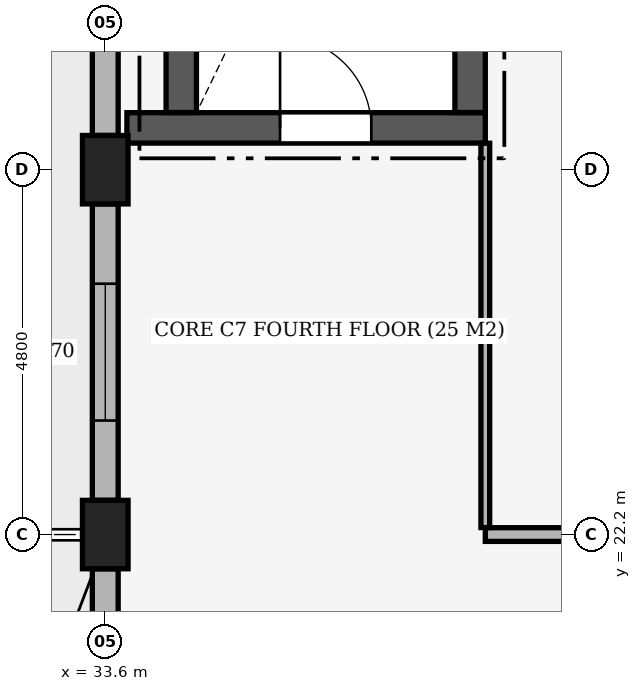
"""IFC4 building model, lengths in metres.
Left out: names, types, materials, properties, quantities, classifications, styles, units other than length and angle.
Written with IfcOpenShell. Run it as: python <this file> out.ifc"""

import sys

from ifc_helpers import new_model, si_unit, direction, frame, frame_2d, origin, origin_2d, place, context, subcontext, project, spatial, rectangle, extrude, element, fill, save


model = new_model("IFC4")
c1 = context("Model", 3, precision=1e-05, world=origin(), true_north=direction((0.0, 1.0)))
c2 = subcontext(c1, "Body", "Model", "MODEL_VIEW")
j1 = project(units=[si_unit("LENGTHUNIT", "METRE"), si_unit("PLANEANGLEUNIT", "RADIAN")], contexts=[c1])
p1 = place(None, origin())
s1 = spatial("IfcSite", under=j1, at=p1, CompositionType="ELEMENT")
p2 = place(p1, origin())
s2 = spatial("IfcBuilding", under=s1, at=p2, CompositionType="ELEMENT")
p3 = place(p2, frame((0.0, 0.0, 20.4)))
s3 = spatial("IfcBuildingStorey", under=s2, at=p3, CompositionType="ELEMENT", Elevation=20.4)
for number, where, z_axis, x_axis in (
    (1, (33.6, 22.2, 0.0), (0.0, 0.0, 1.0), (1.0, 0.0, 0.0)),
    (2, (33.6, 27.0, 0.0), (0.0, 0.0, 1.0), (1.0, 0.0, 0.0)),
):
    element("IfcColumn", number, at=place(p3, frame(where, z_axis=z_axis, x_axis=x_axis)), inside=s3, PredefinedType="COLUMN", context=c2, shape_type="SweptSolid", body=[
        extrude(rectangle(XDim=0.6, YDim=0.9, at=origin_2d()), origin(), (0.0, 0.0, 1.0), 4.8),
    ])
p4 = place(p3, frame((33.6, 5.85, 0.0), z_axis=(0.0, 0.0, 1.0), x_axis=(0.0, 1.0, 0.0)))
e3 = element("IfcWall", 3, at=p4, inside=s3, PredefinedType="SOLIDWALL", context=c2, shape_type="SweptSolid", body=[
    extrude(rectangle(XDim=15.9, YDim=0.34, at=frame_2d((7.95, 0.0))), origin(), (0.0, 0.0, 1.0), 3.5),
])
p5 = place(p4, frame((4.233, 0.0, 1.05)))
e4 = element("IfcOpeningElement", 4, at=p5, cuts=e3, PredefinedType="OPENING", context=c2, shape_type="SweptSolid", body=[
    extrude(rectangle(XDim=1.6, YDim=1.8, at=frame_2d((0.8, 0.9))), frame((0.0, 0.185, 0.0), z_axis=(0.0, -1.0, 0.0), x_axis=(1.0, 0.0, 0.0)), (0.0, 0.0, 1.0), 0.37),
])
p6 = place(p4, frame((10.067, 0.0, 1.05)))
e5 = element("IfcOpeningElement", 5, at=p6, cuts=e3, PredefinedType="OPENING", context=c2, shape_type="SweptSolid", body=[
    extrude(rectangle(XDim=1.6, YDim=1.8, at=frame_2d((0.8, 0.9))), frame((0.0, 0.185, 0.0), z_axis=(0.0, -1.0, 0.0), x_axis=(1.0, 0.0, 0.0)), (0.0, 0.0, 1.0), 0.37),
])
p7 = place(p3, frame((33.6, 22.65, 0.0), z_axis=(0.0, 0.0, 1.0), x_axis=(0.0, 1.0, 0.0)))
e6 = element("IfcWall", 6, at=p7, inside=s3, PredefinedType="SOLIDWALL", context=c2, shape_type="SweptSolid", body=[
    extrude(rectangle(XDim=3.9, YDim=0.34, at=frame_2d((1.95, 0.0))), origin(), (0.0, 0.0, 1.0), 4.0),
])
p8 = place(p7, frame((1.05, 0.0, 0.85)))
e7 = element("IfcOpeningElement", 7, at=p8, cuts=e6, PredefinedType="OPENING", context=c2, shape_type="SweptSolid", body=[
    extrude(rectangle(XDim=1.8, YDim=2.4, at=frame_2d((0.9, 1.2))), frame((0.0, 0.185, 0.0), z_axis=(0.0, -1.0, 0.0), x_axis=(1.0, 0.0, 0.0)), (0.0, 0.0, 1.0), 0.37),
])
p9 = place(p3, frame((33.6, 27.45, 0.0), z_axis=(0.0, 0.0, 1.0), x_axis=(0.0, 1.0, 0.0)))
e8 = element("IfcWall", 8, at=p9, inside=s3, PredefinedType="SOLIDWALL", context=c2, shape_type="SweptSolid", body=[
    extrude(rectangle(XDim=7.65, YDim=0.34, at=frame_2d((3.825, 0.0))), origin(), (0.0, 0.0, 1.0), 3.85),
])
p10 = place(p9, frame((1.35, 0.0, 0.85)))
e9 = element("IfcOpeningElement", 9, at=p10, cuts=e8, PredefinedType="OPENING", context=c2, shape_type="SweptSolid", body=[
    extrude(rectangle(XDim=1.8, YDim=2.4, at=frame_2d((0.9, 1.2))), frame((0.0, 0.185, 0.0), z_axis=(0.0, -1.0, 0.0), x_axis=(1.0, 0.0, 0.0)), (0.0, 0.0, 1.0), 0.37),
])
p11 = place(p9, frame((4.5, 0.0, 0.85)))
e10 = element("IfcOpeningElement", 10, at=p11, cuts=e8, PredefinedType="OPENING", context=c2, shape_type="SweptSolid", body=[
    extrude(rectangle(XDim=1.8, YDim=2.4, at=frame_2d((0.9, 1.2))), frame((0.0, 0.185, 0.0), z_axis=(0.0, -1.0, 0.0), x_axis=(1.0, 0.0, 0.0)), (0.0, 0.0, 1.0), 0.37),
])
p12 = place(p3, frame((33.885, 27.55, 0.0), z_axis=(0.0, 0.0, 1.0), x_axis=(1.0, 0.0, 0.0)))
e11 = element("IfcWall", 11, at=p12, inside=s3, PredefinedType="SHEAR", context=c2, shape_type="SweptSolid", body=[
    extrude(rectangle(XDim=4.715, YDim=0.4, at=frame_2d((2.357, 0.0))), origin(), (0.0, 0.0, 1.0), 4.55),
])
p13 = place(p12, frame((2.015, 0.0, 0.0)))
e12 = element("IfcOpeningElement", 12, at=p13, cuts=e11, PredefinedType="OPENING", context=c2, shape_type="SweptSolid", body=[
    extrude(rectangle(XDim=1.2, YDim=2.2, at=frame_2d((0.6, 1.1))), frame((0.0, 0.215, 0.0), z_axis=(0.0, -1.0, 0.0), x_axis=(1.0, 0.0, 0.0)), (0.0, 0.0, 1.0), 0.43),
])
for number, where, z_axis, x_axis in (
    (13, (34.6, 27.752, 0.0), (0.0, 0.0, 1.0), (0.0, 1.0, 0.0)),
    (14, (38.4, 27.752, 0.0), (0.0, 0.0, 1.0), (0.0, 1.0, 0.0)),
):
    element("IfcWall", number, at=place(p3, frame(where, z_axis=z_axis, x_axis=x_axis)), inside=s3, PredefinedType="SHEAR", context=c2, shape_type="SweptSolid", body=[
        extrude(rectangle(XDim=7.048, YDim=0.4, at=frame_2d((3.524, 0.0))), origin(), (0.0, 0.0, 1.0), 4.55),
    ])
p14 = place(p3, frame((38.6, 22.2, 0.0), z_axis=(0.0, 0.0, 1.0), x_axis=(1.0, 0.0, 0.0)))
e15 = element("IfcWall", 15, at=p14, inside=s3, PredefinedType="PARTITIONING", context=c2, shape_type="SweptSolid", body=[
    extrude(rectangle(XDim=20.7, YDim=0.18, at=frame_2d((10.35, 0.0))), origin(), (0.0, 0.0, 1.0), 3.85),
])
p15 = place(p14, frame((8.725, 0.0, 0.0)))
e16 = element("IfcOpeningElement", 16, at=p15, cuts=e15, PredefinedType="OPENING", context=c2, shape_type="SweptSolid", body=[
    extrude(rectangle(XDim=1.45, YDim=2.25, at=frame_2d((0.725, 1.125))), frame((0.0, 0.105, 0.0), z_axis=(0.0, -1.0, 0.0), x_axis=(1.0, 0.0, 0.0)), (0.0, 0.0, 1.0), 0.21),
])
p16 = place(p3, frame((38.6, 22.292, 0.0), z_axis=(0.0, 0.0, 1.0), x_axis=(0.0, 1.0, 0.0)))
e17 = element("IfcWall", 17, at=p16, inside=s3, PredefinedType="PARTITIONING", context=c2, shape_type="SweptSolid", body=[
    extrude(rectangle(XDim=5.056, YDim=0.115, at=frame_2d((2.528, 0.0))), origin(), (0.0, 0.0, 1.0), 3.85),
])
p17 = place(p8, origin())
e18 = element("IfcWindow", 18, at=p17, inside=s3, PartitioningType="SINGLE_PANEL", PredefinedType="WINDOW", context=c2, shape_type="SweptSolid", body=[
    extrude(rectangle(XDim=1.8, YDim=2.4, at=frame_2d((0.9, 1.2))), frame((0.0, 0.03, 0.0), z_axis=(0.0, -1.0, 0.0), x_axis=(1.0, 0.0, 0.0)), (0.0, 0.0, 1.0), 0.06),
])
fill(e7, e18)
p18 = place(p13, origin())
e19 = element("IfcDoor", 19, at=p18, inside=s3, OperationType="SINGLE_SWING_LEFT", PredefinedType="DOOR", context=c2, shape_type="SweptSolid", body=[
    extrude(rectangle(XDim=1.2, YDim=2.2, at=frame_2d((0.6, 1.1))), frame((0.0, 0.025, 0.0), z_axis=(0.0, -1.0, 0.0), x_axis=(1.0, 0.0, 0.0)), (0.0, 0.0, 1.0), 0.05),
])
fill(e12, e19)
save(model, sys.argv[1])
